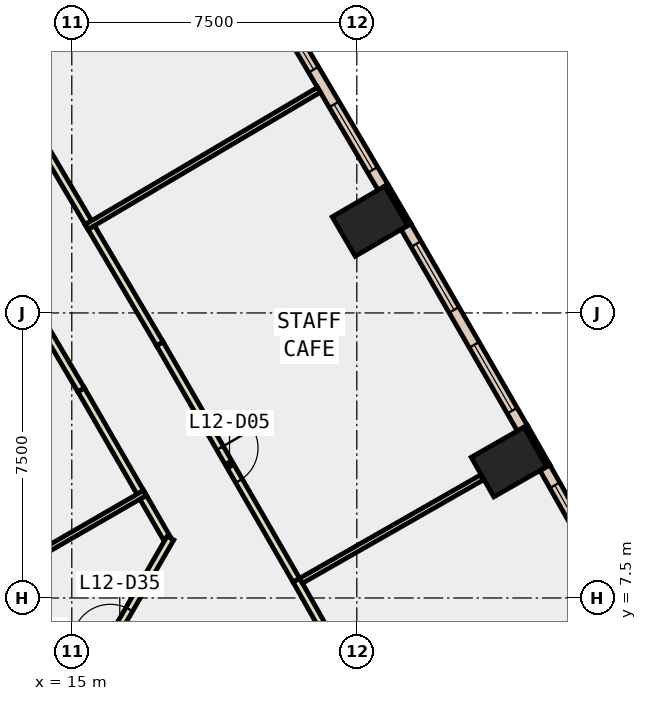
"""IFC4 building model, lengths in metres.
Left out: names, types, materials, properties, quantities, classifications, styles, units other than length and angle.
Written with IfcOpenShell. Run it as: python <this file> out.ifc"""

import sys

from ifc_helpers import new_model, si_unit, direction, frame, frame_2d, origin, origin_2d, place, context, subcontext, project, spatial, rectangle, extrude, element, fill, save


model = new_model("IFC4")
c1 = context("Model", 3, precision=1e-05, world=origin(), true_north=direction((0.0, 1.0)))
c2 = subcontext(c1, "Body", "Model", "MODEL_VIEW")
j1 = project(units=[si_unit("LENGTHUNIT", "METRE"), si_unit("PLANEANGLEUNIT", "RADIAN")], contexts=[c1])
p1 = place(None, origin())
s1 = spatial("IfcSite", under=j1, at=p1, CompositionType="ELEMENT")
p2 = place(p1, origin())
s2 = spatial("IfcBuilding", under=s1, at=p2, CompositionType="ELEMENT")
p3 = place(p2, frame((0.0, 0.0, 60.2)))
s3 = spatial("IfcBuildingStorey", under=s2, at=p3, CompositionType="ELEMENT", Elevation=60.2)
for number, where, z_axis, x_axis in (
    (1, (26.503, 11.078, -0.4), (0.0, 0.0, 1.0), (-0.496, 0.869, 0.0)),
    (2, (22.846, 17.413, -0.4), (0.0, 0.0, 1.0), (-0.504, 0.864, 0.0)),
):
    element("IfcColumn", number, at=place(p3, frame(where, z_axis=z_axis, x_axis=x_axis)), inside=s3, PredefinedType="COLUMN", context=c2, shape_type="SweptSolid", body=[
        extrude(rectangle(XDim=1.2, YDim=1.6, at=origin_2d()), origin(), (0.0, 0.0, 1.0), 4.2),
    ])
p4 = place(p3, frame((27.539, 10.978, 0.0), z_axis=(0.0, 0.0, 1.0), x_axis=(-0.495854054996, 0.868405870629, 0.0)))
e3 = element("IfcWall", 3, at=p4, inside=s3, PredefinedType="STANDARD", context=c2, shape_type="SweptSolid", body=[
    extrude(rectangle(XDim=1.2, YDim=0.1, at=frame_2d((0.6, 0.0))), origin(), (0.0, 0.0, 1.0), 3.8),
])
p5 = place(p3, frame((23.882, 17.324, 0.0), z_axis=(0.0, 0.0, 1.0), x_axis=(-0.504225229382, 0.863572184623, 0.0)))
e4 = element("IfcWall", 4, at=p5, inside=s3, PredefinedType="STANDARD", context=c2, shape_type="SweptSolid", body=[
    extrude(rectangle(XDim=1.2, YDim=0.1, at=frame_2d((0.6, 0.0))), origin(), (0.0, 0.0, 1.0), 3.8),
])
p6 = place(p3, frame((30.462, 5.595, 0.0), z_axis=(0.0, 0.0, 1.0), x_axis=(-0.491887822214, 0.870658584267, 0.0)))
e5 = element("IfcWall", 5, at=p6, inside=s3, PredefinedType="STANDARD", context=c2, shape_type="SweptSolid", body=[
    extrude(rectangle(XDim=6.125, YDim=0.3, at=frame_2d((3.062, 0.0))), origin(), (0.0, 0.0, 1.0), 3.8),
])
p7 = place(p6, frame((0.531, 0.0, 0.9)))
e6 = element("IfcOpeningElement", 6, at=p7, cuts=e5, PredefinedType="OPENING", context=c2, shape_type="SweptSolid", body=[
    extrude(rectangle(XDim=2.0, YDim=2.6, at=frame_2d((1.0, 1.3))), frame((0.0, 0.16, 0.0), z_axis=(0.0, -1.0, 0.0), x_axis=(1.0, 0.0, 0.0)), (0.0, 0.0, 1.0), 0.32),
])
p8 = place(p6, frame((3.594, 0.0, 0.9)))
e7 = element("IfcOpeningElement", 7, at=p8, cuts=e5, PredefinedType="OPENING", context=c2, shape_type="SweptSolid", body=[
    extrude(rectangle(XDim=2.0, YDim=2.6, at=frame_2d((1.0, 1.3))), frame((0.0, 0.16, 0.0), z_axis=(0.0, -1.0, 0.0), x_axis=(1.0, 0.0, 0.0)), (0.0, 0.0, 1.0), 0.32),
])
p9 = place(p3, frame((26.855, 11.968, 0.0), z_axis=(0.0, 0.0, 1.0), x_axis=(-0.499903021601, 0.86608138705, 0.0)))
e8 = element("IfcWall", 8, at=p9, inside=s3, PredefinedType="STANDARD", context=c2, shape_type="SweptSolid", body=[
    extrude(rectangle(XDim=6.125, YDim=0.3, at=frame_2d((3.062, 0.0))), origin(), (0.0, 0.0, 1.0), 3.8),
])
p10 = place(p9, frame((0.531, 0.0, 0.9)))
e9 = element("IfcOpeningElement", 9, at=p10, cuts=e8, PredefinedType="OPENING", context=c2, shape_type="SweptSolid", body=[
    extrude(rectangle(XDim=2.0, YDim=2.6, at=frame_2d((1.0, 1.3))), frame((0.0, 0.16, 0.0), z_axis=(0.0, -1.0, 0.0), x_axis=(1.0, 0.0, 0.0)), (0.0, 0.0, 1.0), 0.32),
])
p11 = place(p9, frame((3.594, 0.0, 0.9)))
e10 = element("IfcOpeningElement", 10, at=p11, cuts=e8, PredefinedType="OPENING", context=c2, shape_type="SweptSolid", body=[
    extrude(rectangle(XDim=2.0, YDim=2.6, at=frame_2d((1.0, 1.3))), frame((0.0, 0.16, 0.0), z_axis=(0.0, -1.0, 0.0), x_axis=(1.0, 0.0, 0.0)), (0.0, 0.0, 1.0), 0.32),
])
p12 = place(p3, frame((23.189, 18.307, 0.0), z_axis=(0.0, 0.0, 1.0), x_axis=(-0.508163938648, 0.861260362177, 0.0)))
e11 = element("IfcWall", 11, at=p12, inside=s3, PredefinedType="STANDARD", context=c2, shape_type="SweptSolid", body=[
    extrude(rectangle(XDim=6.126, YDim=0.3, at=frame_2d((3.063, 0.0))), origin(), (0.0, 0.0, 1.0), 3.8),
])
p13 = place(p12, frame((0.531, 0.0, 0.9)))
e12 = element("IfcOpeningElement", 12, at=p13, cuts=e11, PredefinedType="OPENING", context=c2, shape_type="SweptSolid", body=[
    extrude(rectangle(XDim=2.0, YDim=2.6, at=frame_2d((1.0, 1.3))), frame((0.0, 0.16, 0.0), z_axis=(0.0, -1.0, 0.0), x_axis=(1.0, 0.0, 0.0)), (0.0, 0.0, 1.0), 0.32),
])
p14 = place(p12, frame((3.594, 0.0, 0.9)))
e13 = element("IfcOpeningElement", 13, at=p14, cuts=e11, PredefinedType="OPENING", context=c2, shape_type="SweptSolid", body=[
    extrude(rectangle(XDim=2.0, YDim=2.6, at=frame_2d((1.0, 1.3))), frame((0.0, 0.16, 0.0), z_axis=(0.0, -1.0, 0.0), x_axis=(1.0, 0.0, 0.0)), (0.0, 0.0, 1.0), 0.32),
])
p15 = place(p3, frame((17.497, 9.078, 0.0), z_axis=(0.0, 0.0, 1.0), x_axis=(-0.500126451326, 0.865952384768, 0.0)))
e14 = element("IfcWall", 14, at=p15, inside=s3, PredefinedType="PARTITIONING", context=c2, shape_type="SweptSolid", body=[
    extrude(rectangle(XDim=1.238, YDim=0.2, at=frame_2d((0.619, 0.0))), origin(), (0.0, 0.0, 1.0), 3.8),
])
p16 = place(p3, frame((16.803, 10.28, 0.0), z_axis=(0.0, 0.0, 1.0), x_axis=(-0.499941881293, 0.866058956036, 0.0)))
e15 = element("IfcWall", 15, at=p16, inside=s3, PredefinedType="PARTITIONING", context=c2, shape_type="SweptSolid", body=[
    extrude(rectangle(XDim=3.114, YDim=0.2, at=frame_2d((1.557, 0.0))), origin(), (0.0, 0.0, 1.0), 3.8),
])
p17 = place(p3, frame((15.246, 12.977, 0.0), z_axis=(0.0, 0.0, 1.0), x_axis=(-0.508473864329, 0.861077423519, 0.0)))
e16 = element("IfcWall", 16, at=p17, inside=s3, PredefinedType="PARTITIONING", context=c2, shape_type="SweptSolid", body=[
    extrude(rectangle(XDim=1.9, YDim=0.2, at=frame_2d((0.95, 0.0))), origin(), (0.0, 0.0, 1.0), 3.8),
])
p18 = place(p3, frame((20.909, 7.969, 0.0), z_axis=(0.0, 0.0, 1.0), x_axis=(0.491808171064, -0.870703579225, 0.0)))
e17 = element("IfcWall", 17, at=p18, inside=s3, PredefinedType="PARTITIONING", context=c2, shape_type="SweptSolid", body=[
    extrude(rectangle(XDim=7.332, YDim=0.2, at=frame_2d((3.666, 0.0))), origin(), (0.0, 0.0, 1.0), 3.8),
])
p19 = place(p18, frame((3.166, 0.0, 0.0)))
e18 = element("IfcOpeningElement", 18, at=p19, cuts=e17, PredefinedType="OPENING", context=c2, shape_type="SweptSolid", body=[
    extrude(rectangle(XDim=1.0, YDim=2.1, at=frame_2d((0.5, 1.05))), frame((0.0, 0.11, 0.0), z_axis=(0.0, -1.0, 0.0), x_axis=(1.0, 0.0, 0.0)), (0.0, 0.0, 1.0), 0.22),
])
p20 = place(p3, frame((15.512, 17.248, 0.0), z_axis=(0.0, 0.0, 1.0), x_axis=(0.508178415101, -0.861251820564, 0.0)))
e19 = element("IfcWall", 19, at=p20, inside=s3, PredefinedType="PARTITIONING", context=c2, shape_type="SweptSolid", body=[
    extrude(rectangle(XDim=3.554, YDim=0.2, at=frame_2d((1.777, 0.0))), origin(), (0.0, 0.0, 1.0), 3.8),
])
p21 = place(p3, frame((17.318, 14.187, 0.0), z_axis=(0.0, 0.0, 1.0), x_axis=(0.499986381413, -0.866033266336, 0.0)))
e20 = element("IfcWall", 20, at=p21, inside=s3, PredefinedType="PARTITIONING", context=c2, shape_type="SweptSolid", body=[
    extrude(rectangle(XDim=7.18, YDim=0.2, at=frame_2d((3.59, 0.0))), origin(), (0.0, 0.0, 1.0), 3.8),
])
p22 = place(p21, frame((3.165, 0.0, 0.0)))
e21 = element("IfcOpeningElement", 21, at=p22, cuts=e20, PredefinedType="OPENING", context=c2, shape_type="SweptSolid", body=[
    extrude(rectangle(XDim=1.0, YDim=2.1, at=frame_2d((0.5, 1.05))), frame((0.0, 0.11, 0.0), z_axis=(0.0, -1.0, 0.0), x_axis=(1.0, 0.0, 0.0)), (0.0, 0.0, 1.0), 0.22),
])
p23 = place(p3, frame((13.63, 20.437, 0.0), z_axis=(0.0, 0.0, 1.0), x_axis=(0.508298695021, -0.861180838523, 0.0)))
e22 = element("IfcWall", 22, at=p23, inside=s3, PredefinedType="PARTITIONING", context=c2, shape_type="SweptSolid", body=[
    extrude(rectangle(XDim=3.553, YDim=0.2, at=frame_2d((1.777, 0.0))), origin(), (0.0, 0.0, 1.0), 3.8),
])
p24 = place(p3, frame((11.261, 6.994, 0.0), z_axis=(0.0, 0.0, 1.0), x_axis=(0.866043905515, 0.499967952693, 0.0)))
e23 = element("IfcWall", 23, at=p24, inside=s3, PredefinedType="PARTITIONING", context=c2, shape_type="SweptSolid", body=[
    extrude(rectangle(XDim=6.542, YDim=0.15, at=frame_2d((3.271, 0.0))), origin(), (0.0, 0.0, 1.0), 3.8),
])
p25 = place(p3, frame((13.827, 2.55, 0.0), z_axis=(0.0, 0.0, 1.0), x_axis=(0.500116794417, 0.865957961995, 0.0)))
e24 = element("IfcWall", 24, at=p25, inside=s3, PredefinedType="PARTITIONING", context=c2, shape_type="SweptSolid", body=[
    extrude(rectangle(XDim=7.538, YDim=0.2, at=frame_2d((3.769, 0.0))), origin(), (0.0, 0.0, 1.0), 3.8),
])
p26 = place(p25, frame((3.269, 0.0, 0.0)))
e25 = element("IfcOpeningElement", 25, at=p26, cuts=e24, PredefinedType="OPENING", context=c2, shape_type="SweptSolid", body=[
    extrude(rectangle(XDim=1.0, YDim=2.1, at=frame_2d((0.5, 1.05))), frame((0.0, 0.11, 0.0), z_axis=(0.0, -1.0, 0.0), x_axis=(1.0, 0.0, 0.0)), (0.0, 0.0, 1.0), 0.22),
])
p27 = place(p25, frame((4.369, 0.0, 0.0)))
e26 = element("IfcOpeningElement", 26, at=p27, cuts=e24, PredefinedType="OPENING", context=c2, shape_type="SweptSolid", body=[
    extrude(rectangle(XDim=1.0, YDim=2.1, at=frame_2d((0.5, 1.05))), frame((0.0, 0.11, 0.0), z_axis=(0.0, -1.0, 0.0), x_axis=(1.0, 0.0, 0.0)), (0.0, 0.0, 1.0), 0.22),
])
p28 = place(p3, frame((21.033, 7.953, 0.0), z_axis=(0.0, 0.0, 1.0), x_axis=(0.868311678357, 0.496018980715, 0.0)))
e27 = element("IfcWall", 27, at=p28, inside=s3, PredefinedType="PARTITIONING", context=c2, shape_type="SweptSolid", body=[
    extrude(rectangle(XDim=5.48, YDim=0.15, at=frame_2d((2.74, 0.0))), origin(), (0.0, 0.0, 1.0), 3.8),
])
p29 = place(p3, frame((15.388, 17.261, 0.0), z_axis=(0.0, 0.0, 1.0), x_axis=(0.861189945173, 0.50828326584, 0.0)))
e28 = element("IfcWall", 28, at=p29, inside=s3, PredefinedType="PARTITIONING", context=c2, shape_type="SweptSolid", body=[
    extrude(rectangle(XDim=7.101, YDim=0.15, at=frame_2d((3.55, 0.0))), origin(), (0.0, 0.0, 1.0), 3.8),
])
p30 = place(p8, origin())
e29 = element("IfcWindow", 29, at=p30, inside=s3, PartitioningType="SINGLE_PANEL", PredefinedType="WINDOW", context=c2, shape_type="SweptSolid", body=[
    extrude(rectangle(XDim=2.0, YDim=2.6, at=frame_2d((1.0, 1.3))), frame((0.0, 0.03, 0.0), z_axis=(0.0, -1.0, 0.0), x_axis=(1.0, 0.0, 0.0)), (0.0, 0.0, 1.0), 0.06),
])
fill(e7, e29)
p31 = place(p10, origin())
e30 = element("IfcWindow", 30, at=p31, inside=s3, PartitioningType="SINGLE_PANEL", PredefinedType="WINDOW", context=c2, shape_type="SweptSolid", body=[
    extrude(rectangle(XDim=2.0, YDim=2.6, at=frame_2d((1.0, 1.3))), frame((0.0, 0.03, 0.0), z_axis=(0.0, -1.0, 0.0), x_axis=(1.0, 0.0, 0.0)), (0.0, 0.0, 1.0), 0.06),
])
fill(e9, e30)
p32 = place(p11, origin())
e31 = element("IfcWindow", 31, at=p32, inside=s3, PartitioningType="SINGLE_PANEL", PredefinedType="WINDOW", context=c2, shape_type="SweptSolid", body=[
    extrude(rectangle(XDim=2.0, YDim=2.6, at=frame_2d((1.0, 1.3))), frame((0.0, 0.03, 0.0), z_axis=(0.0, -1.0, 0.0), x_axis=(1.0, 0.0, 0.0)), (0.0, 0.0, 1.0), 0.06),
])
fill(e10, e31)
p33 = place(p13, origin())
e32 = element("IfcWindow", 32, at=p33, inside=s3, PartitioningType="SINGLE_PANEL", PredefinedType="WINDOW", context=c2, shape_type="SweptSolid", body=[
    extrude(rectangle(XDim=2.0, YDim=2.6, at=frame_2d((1.0, 1.3))), frame((0.0, 0.03, 0.0), z_axis=(0.0, -1.0, 0.0), x_axis=(1.0, 0.0, 0.0)), (0.0, 0.0, 1.0), 0.06),
])
fill(e12, e32)
p34 = place(p14, origin())
e33 = element("IfcWindow", 33, at=p34, inside=s3, PartitioningType="SINGLE_PANEL", PredefinedType="WINDOW", context=c2, shape_type="SweptSolid", body=[
    extrude(rectangle(XDim=2.0, YDim=2.6, at=frame_2d((1.0, 1.3))), frame((0.0, 0.03, 0.0), z_axis=(0.0, -1.0, 0.0), x_axis=(1.0, 0.0, 0.0)), (0.0, 0.0, 1.0), 0.06),
])
fill(e13, e33)
p35 = place(p22, origin())
e34 = element("IfcDoor", 34, at=p35, inside=s3, OperationType="SINGLE_SWING_LEFT", PredefinedType="DOOR", context=c2, shape_type="SweptSolid", body=[
    extrude(rectangle(XDim=1.0, YDim=2.1, at=frame_2d((0.5, 1.05))), frame((0.0, 0.025, 0.0), z_axis=(0.0, -1.0, 0.0), x_axis=(1.0, 0.0, 0.0)), (0.0, 0.0, 1.0), 0.05),
])
fill(e21, e34)
p36 = place(p27, origin())
e35 = element("IfcDoor", 35, at=p36, inside=s3, OperationType="SINGLE_SWING_RIGHT", PredefinedType="DOOR", context=c2, shape_type="SweptSolid", body=[
    extrude(rectangle(XDim=1.0, YDim=2.1, at=frame_2d((0.5, 1.05))), frame((0.0, 0.025, 0.0), z_axis=(0.0, -1.0, 0.0), x_axis=(1.0, 0.0, 0.0)), (0.0, 0.0, 1.0), 0.05),
])
fill(e26, e35)
save(model, sys.argv[1])
